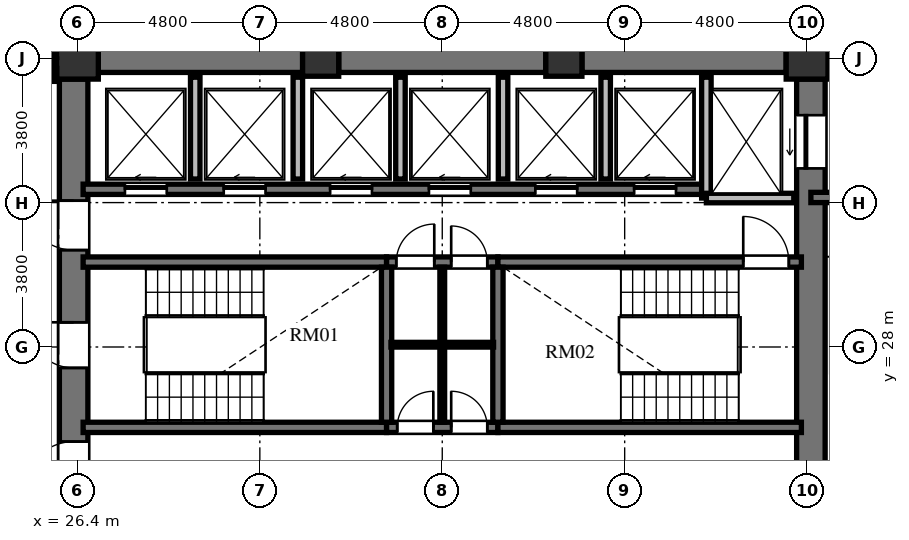
"""IFC4 building model, lengths in metres.
Left out: names, types, materials, properties, quantities, classifications, styles, units other than length and angle.
Written with IfcOpenShell. Run it as: python <this file> out.ifc"""

import sys

from ifc_helpers import new_model, si_unit, direction, frame, frame_2d, origin, origin_2d, place, context, subcontext, project, spatial, rectangle, extrude, element, fill, save


model = new_model("IFC4")
c1 = context("Model", 3, precision=1e-05, world=origin(), true_north=direction((0.0, 1.0)))
c2 = subcontext(c1, "Body", "Model", "MODEL_VIEW")
j1 = project(units=[si_unit("LENGTHUNIT", "METRE"), si_unit("PLANEANGLEUNIT", "RADIAN")], contexts=[c1])
p1 = place(None, origin())
s1 = spatial("IfcSite", under=j1, at=p1, CompositionType="ELEMENT")
p2 = place(p1, origin())
s2 = spatial("IfcBuilding", under=s1, at=p2, CompositionType="ELEMENT")
p3 = place(p2, frame((0.0, 0.0, 89.04)))
s3 = spatial("IfcBuildingStorey", under=s2, at=p3, CompositionType="ELEMENT", Elevation=89.04)
p4 = place(p3, frame((45.6, 35.6, 0.0), z_axis=(0.0, 0.0, 1.0), x_axis=(1.0, 0.0, 0.0)))
e1 = element("IfcColumn", 1, at=p4, inside=s3, PredefinedType="COLUMN", context=c2, shape_type="SweptSolid", body=[
    extrude(rectangle(XDim=1.1, YDim=1.1, at=origin_2d()), origin(), (0.0, 0.0, 1.0), 3.648),
])
for number, where, z_axis, x_axis in (
    (2, (39.2, 35.6, 0.0), (0.0, 0.0, 1.0), (1.0, 0.0, 0.0)),
    (3, (32.8, 35.6, 0.0), (0.0, 0.0, 1.0), (1.0, 0.0, 0.0)),
):
    element("IfcColumn", number, at=place(p3, frame(where, z_axis=z_axis, x_axis=x_axis)), inside=s3, PredefinedType="COLUMN", context=c2, shape_type="SweptSolid", body=[
        extrude(rectangle(XDim=0.95, YDim=0.95, at=origin_2d()), origin(), (0.0, 0.0, 1.0), 3.648),
    ])
p5 = place(p3, frame((26.4, 35.6, 0.0), z_axis=(0.0, 0.0, 1.0), x_axis=(1.0, 0.0, 0.0)))
e4 = element("IfcColumn", 4, at=p5, inside=s3, PredefinedType="COLUMN", context=c2, shape_type="SweptSolid", body=[
    extrude(rectangle(XDim=1.1, YDim=1.1, at=origin_2d()), origin(), (0.0, 0.0, 1.0), 3.648),
])
p6 = place(p3, frame((26.3, 20.95, 0.0), z_axis=(0.0, 0.0, 1.0), x_axis=(0.0, 1.0, 0.0)))
e5 = element("IfcWall", 5, at=p6, inside=s3, PredefinedType="SHEAR", context=c2, shape_type="SweptSolid", body=[
    extrude(rectangle(XDim=14.1, YDim=0.75, at=frame_2d((7.05, 0.0))), origin(), (0.0, 0.0, 1.0), 3.648),
])
p7 = place(p6, frame((6.5, 0.0, 0.0)))
e6 = element("IfcOpeningElement", 6, at=p7, cuts=e5, PredefinedType="OPENING", context=c2, shape_type="SweptSolid", body=[
    extrude(rectangle(XDim=1.2, YDim=2.15, at=frame_2d((0.6, 1.075))), frame((0.0, 0.385, 0.0), z_axis=(0.0, -1.0, 0.0), x_axis=(1.0, 0.0, 0.0)), (0.0, 0.0, 1.0), 0.77),
])
p8 = place(p6, frame((9.6, 0.0, 0.0)))
e7 = element("IfcOpeningElement", 7, at=p8, cuts=e5, PredefinedType="OPENING", context=c2, shape_type="SweptSolid", body=[
    extrude(rectangle(XDim=1.3, YDim=2.2, at=frame_2d((0.65, 1.1))), frame((0.0, 0.385, 0.0), z_axis=(0.0, -1.0, 0.0), x_axis=(1.0, 0.0, 0.0)), (0.0, 0.0, 1.0), 0.77),
])
p9 = place(p6, frame((3.26, 0.0, 0.0)))
e8 = element("IfcOpeningElement", 8, at=p9, cuts=e5, PredefinedType="OPENING", context=c2, shape_type="SweptSolid", body=[
    extrude(rectangle(XDim=1.3, YDim=2.2, at=frame_2d((0.65, 1.1))), frame((0.0, 0.385, 0.0), z_axis=(0.0, -1.0, 0.0), x_axis=(1.0, 0.0, 0.0)), (0.0, 0.0, 1.0), 0.77),
])
p10 = place(p3, frame((45.7, 20.95, 0.0), z_axis=(0.0, 0.0, 1.0), x_axis=(0.0, 1.0, 0.0)))
e9 = element("IfcWall", 9, at=p10, inside=s3, PredefinedType="SHEAR", context=c2, shape_type="SweptSolid", body=[
    extrude(rectangle(XDim=14.1, YDim=0.75, at=frame_2d((7.05, 0.0))), origin(), (0.0, 0.0, 1.0), 3.648),
])
p11 = place(p10, frame((11.75, 0.0, 0.0)))
e10 = element("IfcOpeningElement", 10, at=p11, cuts=e9, PredefinedType="OPENING", context=c2, shape_type="SweptSolid", body=[
    extrude(rectangle(XDim=1.4, YDim=2.3, at=frame_2d((0.7, 1.15))), frame((0.0, 0.385, 0.0), z_axis=(0.0, -1.0, 0.0), x_axis=(1.0, 0.0, 0.0)), (0.0, 0.0, 1.0), 0.77),
])
p12 = place(p10, frame((0.95, 0.0, 0.0)))
e11 = element("IfcOpeningElement", 11, at=p12, cuts=e9, PredefinedType="OPENING", context=c2, shape_type="SweptSolid", body=[
    extrude(rectangle(XDim=1.4, YDim=2.3, at=frame_2d((0.7, 1.15))), frame((0.0, 0.385, 0.0), z_axis=(0.0, -1.0, 0.0), x_axis=(1.0, 0.0, 0.0)), (0.0, 0.0, 1.0), 0.77),
])
p13 = place(p3, frame((26.95, 35.6, 0.0), z_axis=(0.0, 0.0, 1.0), x_axis=(1.0, 0.0, 0.0)))
e12 = element("IfcWall", 12, at=p13, inside=s3, PredefinedType="SHEAR", context=c2, shape_type="SweptSolid", body=[
    extrude(rectangle(XDim=5.375, YDim=0.75, at=frame_2d((2.688, 0.0))), origin(), (0.0, 0.0, 1.0), 3.648),
])
p14 = place(p3, frame((33.275, 35.6, 0.0), z_axis=(0.0, 0.0, 1.0), x_axis=(1.0, 0.0, 0.0)))
e13 = element("IfcWall", 13, at=p14, inside=s3, PredefinedType="SHEAR", context=c2, shape_type="SweptSolid", body=[
    extrude(rectangle(XDim=5.45, YDim=0.75, at=frame_2d((2.725, 0.0))), origin(), (0.0, 0.0, 1.0), 3.648),
])
p15 = place(p3, frame((39.675, 35.6, 0.0), z_axis=(0.0, 0.0, 1.0), x_axis=(1.0, 0.0, 0.0)))
e14 = element("IfcWall", 14, at=p15, inside=s3, PredefinedType="SHEAR", context=c2, shape_type="SweptSolid", body=[
    extrude(rectangle(XDim=5.375, YDim=0.75, at=frame_2d((2.688, 0.0))), origin(), (0.0, 0.0, 1.0), 3.648),
])
p16 = place(p3, frame((26.55, 30.235, 0.0), z_axis=(0.0, 0.0, 1.0), x_axis=(1.0, 0.0, 0.0)))
e15 = element("IfcWall", 15, at=p16, inside=s3, PredefinedType="SHEAR", context=c2, shape_type="SweptSolid", body=[
    extrude(rectangle(XDim=7.985, YDim=0.27, at=frame_2d((3.992, 0.0))), origin(), (0.0, 0.0, 1.0), 3.648),
])
p17 = place(p3, frame((34.535, 30.235, 0.0), z_axis=(0.0, 0.0, 1.0), x_axis=(1.0, 0.0, 0.0)))
e16 = element("IfcWall", 16, at=p17, inside=s3, PredefinedType="SHEAR", context=c2, shape_type="SweptSolid", body=[
    extrude(rectangle(XDim=2.93, YDim=0.27, at=frame_2d((1.465, 0.0))), origin(), (0.0, 0.0, 1.0), 3.648),
])
p18 = place(p17, frame((0.255, 0.0, 0.0)))
e17 = element("IfcOpeningElement", 17, at=p18, cuts=e16, PredefinedType="OPENING", context=c2, shape_type="SweptSolid", body=[
    extrude(rectangle(XDim=1.0, YDim=2.1, at=frame_2d((0.5, 1.05))), frame((0.0, 0.145, 0.0), z_axis=(0.0, -1.0, 0.0), x_axis=(1.0, 0.0, 0.0)), (0.0, 0.0, 1.0), 0.29),
])
p19 = place(p17, frame((1.7, 0.0, 0.0)))
e18 = element("IfcOpeningElement", 18, at=p19, cuts=e16, PredefinedType="OPENING", context=c2, shape_type="SweptSolid", body=[
    extrude(rectangle(XDim=0.95, YDim=2.1, at=frame_2d((0.475, 1.05))), frame((0.0, 0.145, 0.0), z_axis=(0.0, -1.0, 0.0), x_axis=(1.0, 0.0, 0.0)), (0.0, 0.0, 1.0), 0.29),
])
p20 = place(p3, frame((37.465, 30.235, 0.0), z_axis=(0.0, 0.0, 1.0), x_axis=(1.0, 0.0, 0.0)))
e19 = element("IfcWall", 19, at=p20, inside=s3, PredefinedType="SHEAR", context=c2, shape_type="SweptSolid", body=[
    extrude(rectangle(XDim=7.985, YDim=0.27, at=frame_2d((3.992, 0.0))), origin(), (0.0, 0.0, 1.0), 3.648),
])
p21 = place(p20, frame((6.455, 0.0, 0.0)))
e20 = element("IfcOpeningElement", 20, at=p21, cuts=e19, PredefinedType="OPENING", context=c2, shape_type="SweptSolid", body=[
    extrude(rectangle(XDim=1.2, YDim=2.15, at=frame_2d((0.6, 1.075))), frame((0.0, 0.145, 0.0), z_axis=(0.0, -1.0, 0.0), x_axis=(1.0, 0.0, 0.0)), (0.0, 0.0, 1.0), 0.29),
])
p22 = place(p3, frame((26.55, 25.885, 0.0), z_axis=(0.0, 0.0, 1.0), x_axis=(1.0, 0.0, 0.0)))
e21 = element("IfcWall", 21, at=p22, inside=s3, PredefinedType="SHEAR", context=c2, shape_type="SweptSolid", body=[
    extrude(rectangle(XDim=7.985, YDim=0.27, at=frame_2d((3.992, 0.0))), origin(), (0.0, 0.0, 1.0), 3.648),
])
p23 = place(p3, frame((34.535, 25.885, 0.0), z_axis=(0.0, 0.0, 1.0), x_axis=(1.0, 0.0, 0.0)))
e22 = element("IfcWall", 22, at=p23, inside=s3, PredefinedType="SHEAR", context=c2, shape_type="SweptSolid", body=[
    extrude(rectangle(XDim=2.93, YDim=0.27, at=frame_2d((1.465, 0.0))), origin(), (0.0, 0.0, 1.0), 3.648),
])
p24 = place(p23, frame((0.28, 0.0, 0.0)))
e23 = element("IfcOpeningElement", 23, at=p24, cuts=e22, PredefinedType="OPENING", context=c2, shape_type="SweptSolid", body=[
    extrude(rectangle(XDim=0.95, YDim=2.1, at=frame_2d((0.475, 1.05))), frame((0.0, 0.145, 0.0), z_axis=(0.0, -1.0, 0.0), x_axis=(1.0, 0.0, 0.0)), (0.0, 0.0, 1.0), 0.29),
])
p25 = place(p23, frame((1.7, 0.0, 0.0)))
e24 = element("IfcOpeningElement", 24, at=p25, cuts=e22, PredefinedType="OPENING", context=c2, shape_type="SweptSolid", body=[
    extrude(rectangle(XDim=0.95, YDim=2.1, at=frame_2d((0.475, 1.05))), frame((0.0, 0.145, 0.0), z_axis=(0.0, -1.0, 0.0), x_axis=(1.0, 0.0, 0.0)), (0.0, 0.0, 1.0), 0.29),
])
p26 = place(p3, frame((37.465, 25.885, 0.0), z_axis=(0.0, 0.0, 1.0), x_axis=(1.0, 0.0, 0.0)))
e25 = element("IfcWall", 25, at=p26, inside=s3, PredefinedType="SHEAR", context=c2, shape_type="SweptSolid", body=[
    extrude(rectangle(XDim=7.985, YDim=0.27, at=frame_2d((3.992, 0.0))), origin(), (0.0, 0.0, 1.0), 3.648),
])
for number, where, z_axis, x_axis in (
    (26, (34.535, 26.02, 0.0), (0.0, 0.0, 1.0), (0.0, 1.0, 0.0)),
    (27, (37.465, 26.02, 0.0), (0.0, 0.0, 1.0), (0.0, 1.0, 0.0)),
):
    element("IfcWall", number, at=place(p3, frame(where, z_axis=z_axis, x_axis=x_axis)), inside=s3, PredefinedType="SHEAR", context=c2, shape_type="SweptSolid", body=[
        extrude(rectangle(XDim=4.08, YDim=0.27, at=frame_2d((2.04, 0.0))), origin(), (0.0, 0.0, 1.0), 3.648),
    ])
p27 = place(p3, frame((34.65, 28.06, 0.0), z_axis=(0.0, 0.0, 1.0), x_axis=(1.0, 0.0, 0.0)))
e28 = element("IfcWall", 28, at=p27, inside=s3, PredefinedType="PARTITIONING", context=c2, shape_type="SweptSolid", body=[
    extrude(rectangle(XDim=2.7, YDim=0.125, at=frame_2d((1.35, 0.0))), origin(), (0.0, 0.0, 1.0), 3.428),
])
p28 = place(p3, frame((36.0, 26.02, 0.0), z_axis=(0.0, 0.0, 1.0), x_axis=(0.0, 1.0, 0.0)))
e29 = element("IfcWall", 29, at=p28, inside=s3, PredefinedType="PARTITIONING", context=c2, shape_type="SweptSolid", body=[
    extrude(rectangle(XDim=4.08, YDim=0.125, at=frame_2d((2.04, 0.0))), origin(), (0.0, 0.0, 1.0), 3.428),
])
p29 = place(p3, frame((26.55, 32.15, 0.0), z_axis=(0.0, 0.0, 1.0), x_axis=(1.0, 0.0, 0.0)))
e30 = element("IfcWall", 30, at=p29, inside=s3, PredefinedType="SHEAR", context=c2, shape_type="SweptSolid", body=[
    extrude(rectangle(XDim=16.4, YDim=0.27, at=frame_2d((8.2, 0.0))), origin(), (0.0, 0.0, 1.0), 3.648),
])
p30 = place(p29, frame((1.1, 0.0, 0.0)))
e31 = element("IfcOpeningElement", 31, at=p30, cuts=e30, PredefinedType="OPENING", context=c2, shape_type="SweptSolid", body=[
    extrude(rectangle(XDim=1.1, YDim=2.2, at=frame_2d((0.55, 1.1))), frame((0.0, 0.145, 0.0), z_axis=(0.0, -1.0, 0.0), x_axis=(1.0, 0.0, 0.0)), (0.0, 0.0, 1.0), 0.29),
])
p31 = place(p29, frame((3.7, 0.0, 0.0)))
e32 = element("IfcOpeningElement", 32, at=p31, cuts=e30, PredefinedType="OPENING", context=c2, shape_type="SweptSolid", body=[
    extrude(rectangle(XDim=1.1, YDim=2.2, at=frame_2d((0.55, 1.1))), frame((0.0, 0.145, 0.0), z_axis=(0.0, -1.0, 0.0), x_axis=(1.0, 0.0, 0.0)), (0.0, 0.0, 1.0), 0.29),
])
p32 = place(p29, frame((6.5, 0.0, 0.0)))
e33 = element("IfcOpeningElement", 33, at=p32, cuts=e30, PredefinedType="OPENING", context=c2, shape_type="SweptSolid", body=[
    extrude(rectangle(XDim=1.1, YDim=2.2, at=frame_2d((0.55, 1.1))), frame((0.0, 0.145, 0.0), z_axis=(0.0, -1.0, 0.0), x_axis=(1.0, 0.0, 0.0)), (0.0, 0.0, 1.0), 0.29),
])
p33 = place(p29, frame((9.1, 0.0, 0.0)))
e34 = element("IfcOpeningElement", 34, at=p33, cuts=e30, PredefinedType="OPENING", context=c2, shape_type="SweptSolid", body=[
    extrude(rectangle(XDim=1.1, YDim=2.2, at=frame_2d((0.55, 1.1))), frame((0.0, 0.145, 0.0), z_axis=(0.0, -1.0, 0.0), x_axis=(1.0, 0.0, 0.0)), (0.0, 0.0, 1.0), 0.29),
])
p34 = place(p29, frame((11.9, 0.0, 0.0)))
e35 = element("IfcOpeningElement", 35, at=p34, cuts=e30, PredefinedType="OPENING", context=c2, shape_type="SweptSolid", body=[
    extrude(rectangle(XDim=1.1, YDim=2.2, at=frame_2d((0.55, 1.1))), frame((0.0, 0.145, 0.0), z_axis=(0.0, -1.0, 0.0), x_axis=(1.0, 0.0, 0.0)), (0.0, 0.0, 1.0), 0.29),
])
p35 = place(p29, frame((14.5, 0.0, 0.0)))
e36 = element("IfcOpeningElement", 36, at=p35, cuts=e30, PredefinedType="OPENING", context=c2, shape_type="SweptSolid", body=[
    extrude(rectangle(XDim=1.1, YDim=2.2, at=frame_2d((0.55, 1.1))), frame((0.0, 0.145, 0.0), z_axis=(0.0, -1.0, 0.0), x_axis=(1.0, 0.0, 0.0)), (0.0, 0.0, 1.0), 0.29),
])
p36 = place(p3, frame((42.95, 31.92, 0.0), z_axis=(0.0, 0.0, 1.0), x_axis=(0.0, 1.0, 0.0)))
e37 = element("IfcWall", 37, at=p36, inside=s3, PredefinedType="SOLIDWALL", context=c2, shape_type="SweptSolid", body=[
    extrude(rectangle(XDim=3.18, YDim=0.25, at=frame_2d((1.59, 0.0))), origin(), (0.0, 0.0, 1.0), 3.428),
])
p37 = place(p3, frame((42.95, 31.92, 0.0), z_axis=(0.0, 0.0, 1.0), x_axis=(1.0, 0.0, 0.0)))
e38 = element("IfcWall", 38, at=p37, inside=s3, PredefinedType="SOLIDWALL", context=c2, shape_type="SweptSolid", body=[
    extrude(rectangle(XDim=2.3, YDim=0.25, at=frame_2d((1.15, 0.0))), origin(), (0.0, 0.0, 1.0), 3.428),
])
for number, where, z_axis, x_axis in (
    (39, (29.5, 32.42, 0.0), (0.0, 0.0, 1.0), (0.0, 1.0, 0.0)),
    (40, (32.2, 32.42, 0.0), (0.0, 0.0, 1.0), (0.0, 1.0, 0.0)),
    (41, (34.9, 32.42, 0.0), (0.0, 0.0, 1.0), (0.0, 1.0, 0.0)),
    (42, (37.6, 32.42, 0.0), (0.0, 0.0, 1.0), (0.0, 1.0, 0.0)),
    (43, (40.3, 32.42, 0.0), (0.0, 0.0, 1.0), (0.0, 1.0, 0.0)),
):
    element("IfcWall", number, at=place(p3, frame(where, z_axis=z_axis, x_axis=x_axis)), inside=s3, PredefinedType="SOLIDWALL", context=c2, shape_type="SweptSolid", body=[
        extrude(rectangle(XDim=2.68, YDim=0.25, at=frame_2d((1.34, 0.0))), origin(), (0.0, 0.0, 1.0), 3.428),
    ])
p38 = place(p3, frame((45.7, 31.935, 0.0), z_axis=(0.0, 0.0, 1.0), x_axis=(1.0, 0.0, 0.0)))
e44 = element("IfcWall", 44, at=p38, inside=s3, PredefinedType="SHEAR", context=c2, shape_type="SweptSolid", body=[
    extrude(rectangle(XDim=4.715, YDim=0.27, at=frame_2d((2.357, 0.0))), origin(), (0.0, 0.0, 1.0), 3.648),
])
p39 = place(p3, frame((25.83, 36.21, 0.0), z_axis=(0.0, 0.0, 1.0), x_axis=(0.0, -1.0, 0.0)))
e45 = element("IfcWall", 45, at=p39, inside=s3, PredefinedType="PARTITIONING", context=c2, shape_type="SweptSolid", body=[
    extrude(rectangle(XDim=1.22, YDim=0.18, at=frame_2d((0.61, 0.0))), origin(), (0.0, 0.0, 1.0), 3.428),
])
p40 = place(p7, origin())
e46 = element("IfcDoor", 46, at=p40, inside=s3, OperationType="SINGLE_SWING_RIGHT", PredefinedType="DOOR", context=c2, shape_type="SweptSolid", body=[
    extrude(rectangle(XDim=1.2, YDim=2.15, at=frame_2d((0.6, 1.075))), frame((0.0, 0.025, 0.0), z_axis=(0.0, -1.0, 0.0), x_axis=(1.0, 0.0, 0.0)), (0.0, 0.0, 1.0), 0.05),
])
fill(e6, e46)
p41 = place(p21, origin())
e47 = element("IfcDoor", 47, at=p41, inside=s3, OperationType="SINGLE_SWING_LEFT", PredefinedType="DOOR", context=c2, shape_type="SweptSolid", body=[
    extrude(rectangle(XDim=1.2, YDim=2.15, at=frame_2d((0.6, 1.075))), frame((0.0, 0.025, 0.0), z_axis=(0.0, -1.0, 0.0), x_axis=(1.0, 0.0, 0.0)), (0.0, 0.0, 1.0), 0.05),
])
fill(e20, e47)
p42 = place(p24, origin())
e48 = element("IfcDoor", 48, at=p42, inside=s3, OperationType="SINGLE_SWING_RIGHT", PredefinedType="DOOR", context=c2, shape_type="SweptSolid", body=[
    extrude(rectangle(XDim=0.95, YDim=2.1, at=frame_2d((0.475, 1.05))), frame((0.0, 0.025, 0.0), z_axis=(0.0, -1.0, 0.0), x_axis=(1.0, 0.0, 0.0)), (0.0, 0.0, 1.0), 0.05),
])
fill(e23, e48)
p43 = place(p25, origin())
e49 = element("IfcDoor", 49, at=p43, inside=s3, OperationType="SINGLE_SWING_LEFT", PredefinedType="DOOR", context=c2, shape_type="SweptSolid", body=[
    extrude(rectangle(XDim=0.95, YDim=2.1, at=frame_2d((0.475, 1.05))), frame((0.0, 0.025, 0.0), z_axis=(0.0, -1.0, 0.0), x_axis=(1.0, 0.0, 0.0)), (0.0, 0.0, 1.0), 0.05),
])
fill(e24, e49)
p44 = place(p18, origin())
e50 = element("IfcDoor", 50, at=p44, inside=s3, OperationType="SINGLE_SWING_RIGHT", PredefinedType="DOOR", context=c2, shape_type="SweptSolid", body=[
    extrude(rectangle(XDim=1.0, YDim=2.1, at=frame_2d((0.5, 1.05))), frame((0.0, 0.025, 0.0), z_axis=(0.0, -1.0, 0.0), x_axis=(1.0, 0.0, 0.0)), (0.0, 0.0, 1.0), 0.05),
])
fill(e17, e50)
p45 = place(p19, origin())
e51 = element("IfcDoor", 51, at=p45, inside=s3, OperationType="SINGLE_SWING_LEFT", PredefinedType="DOOR", context=c2, shape_type="SweptSolid", body=[
    extrude(rectangle(XDim=0.95, YDim=2.1, at=frame_2d((0.475, 1.05))), frame((0.0, 0.025, 0.0), z_axis=(0.0, -1.0, 0.0), x_axis=(1.0, 0.0, 0.0)), (0.0, 0.0, 1.0), 0.05),
])
fill(e18, e51)
p46 = place(p8, origin())
e52 = element("IfcDoor", 52, at=p46, inside=s3, OperationType="SINGLE_SWING_RIGHT", PredefinedType="DOOR", context=c2, shape_type="SweptSolid", body=[
    extrude(rectangle(XDim=1.3, YDim=2.2, at=frame_2d((0.65, 1.1))), frame((0.0, 0.025, 0.0), z_axis=(0.0, -1.0, 0.0), x_axis=(1.0, 0.0, 0.0)), (0.0, 0.0, 1.0), 0.05),
])
fill(e7, e52)
p47 = place(p9, origin())
e53 = element("IfcDoor", 53, at=p47, inside=s3, OperationType="SINGLE_SWING_LEFT", PredefinedType="DOOR", context=c2, shape_type="SweptSolid", body=[
    extrude(rectangle(XDim=1.3, YDim=2.2, at=frame_2d((0.65, 1.1))), frame((0.0, 0.025, 0.0), z_axis=(0.0, -1.0, 0.0), x_axis=(1.0, 0.0, 0.0)), (0.0, 0.0, 1.0), 0.05),
])
fill(e8, e53)
p48 = place(p30, origin())
e54 = element("IfcDoor", 54, at=p48, inside=s3, OperationType="SLIDING_TO_LEFT", PredefinedType="DOOR", context=c2, shape_type="SweptSolid", body=[
    extrude(rectangle(XDim=1.1, YDim=2.2, at=frame_2d((0.55, 1.1))), frame((0.0, 0.025, 0.0), z_axis=(0.0, -1.0, 0.0), x_axis=(1.0, 0.0, 0.0)), (0.0, 0.0, 1.0), 0.05),
])
fill(e31, e54)
p49 = place(p31, origin())
e55 = element("IfcDoor", 55, at=p49, inside=s3, OperationType="SLIDING_TO_LEFT", PredefinedType="DOOR", context=c2, shape_type="SweptSolid", body=[
    extrude(rectangle(XDim=1.1, YDim=2.2, at=frame_2d((0.55, 1.1))), frame((0.0, 0.025, 0.0), z_axis=(0.0, -1.0, 0.0), x_axis=(1.0, 0.0, 0.0)), (0.0, 0.0, 1.0), 0.05),
])
fill(e32, e55)
p50 = place(p32, origin())
e56 = element("IfcDoor", 56, at=p50, inside=s3, OperationType="SLIDING_TO_LEFT", PredefinedType="DOOR", context=c2, shape_type="SweptSolid", body=[
    extrude(rectangle(XDim=1.1, YDim=2.2, at=frame_2d((0.55, 1.1))), frame((0.0, 0.025, 0.0), z_axis=(0.0, -1.0, 0.0), x_axis=(1.0, 0.0, 0.0)), (0.0, 0.0, 1.0), 0.05),
])
fill(e33, e56)
p51 = place(p33, origin())
e57 = element("IfcDoor", 57, at=p51, inside=s3, OperationType="SLIDING_TO_LEFT", PredefinedType="DOOR", context=c2, shape_type="SweptSolid", body=[
    extrude(rectangle(XDim=1.1, YDim=2.2, at=frame_2d((0.55, 1.1))), frame((0.0, 0.025, 0.0), z_axis=(0.0, -1.0, 0.0), x_axis=(1.0, 0.0, 0.0)), (0.0, 0.0, 1.0), 0.05),
])
fill(e34, e57)
p52 = place(p34, origin())
e58 = element("IfcDoor", 58, at=p52, inside=s3, OperationType="SLIDING_TO_LEFT", PredefinedType="DOOR", context=c2, shape_type="SweptSolid", body=[
    extrude(rectangle(XDim=1.1, YDim=2.2, at=frame_2d((0.55, 1.1))), frame((0.0, 0.025, 0.0), z_axis=(0.0, -1.0, 0.0), x_axis=(1.0, 0.0, 0.0)), (0.0, 0.0, 1.0), 0.05),
])
fill(e35, e58)
p53 = place(p35, origin())
e59 = element("IfcDoor", 59, at=p53, inside=s3, OperationType="SLIDING_TO_LEFT", PredefinedType="DOOR", context=c2, shape_type="SweptSolid", body=[
    extrude(rectangle(XDim=1.1, YDim=2.2, at=frame_2d((0.55, 1.1))), frame((0.0, 0.025, 0.0), z_axis=(0.0, -1.0, 0.0), x_axis=(1.0, 0.0, 0.0)), (0.0, 0.0, 1.0), 0.05),
])
fill(e36, e59)
p54 = place(p11, origin())
e60 = element("IfcDoor", 60, at=p54, inside=s3, OperationType="SLIDING_TO_LEFT", PredefinedType="DOOR", context=c2, shape_type="SweptSolid", body=[
    extrude(rectangle(XDim=1.4, YDim=2.3, at=frame_2d((0.7, 1.15))), frame((0.0, 0.025, 0.0), z_axis=(0.0, -1.0, 0.0), x_axis=(1.0, 0.0, 0.0)), (0.0, 0.0, 1.0), 0.05),
])
fill(e10, e60)
save(model, sys.argv[1])
